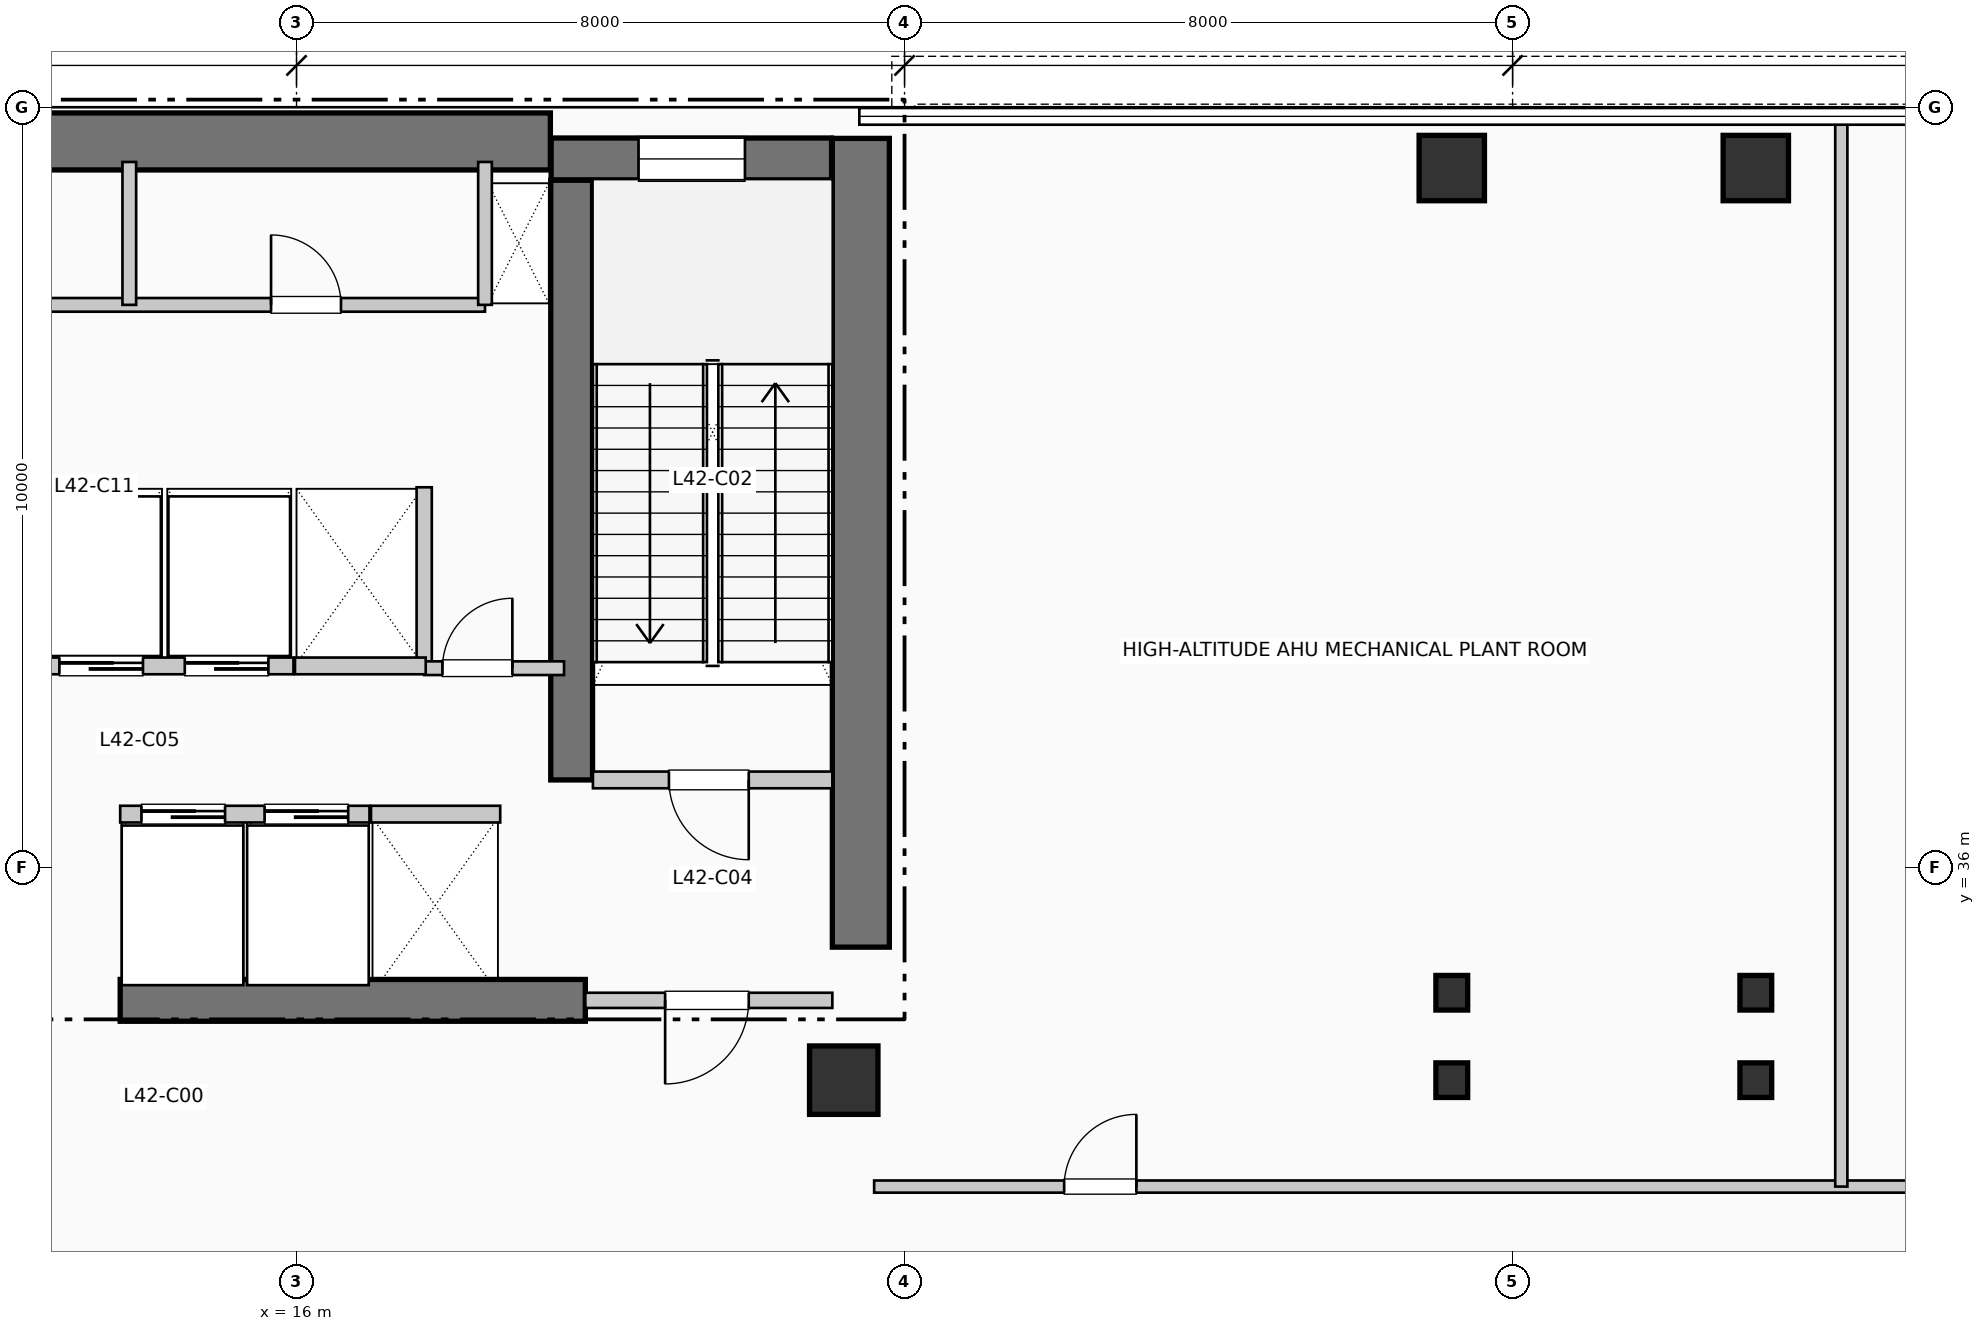
"""IFC4 building model, lengths in metres.
Left out: names, types, materials, properties, quantities, classifications, styles, units other than length and angle.
Written with IfcOpenShell. Run it as: python <this file> out.ifc"""

import sys

from ifc_helpers import new_model, si_unit, direction, frame, frame_2d, origin, origin_2d, place, context, subcontext, project, spatial, rectangle, i_section, extrude, element, fill, save


model = new_model("IFC4")
c1 = context("Model", 3, precision=1e-05, world=origin(), true_north=direction((0.0, 1.0)))
c2 = subcontext(c1, "Body", "Model", "MODEL_VIEW")
j1 = project(units=[si_unit("LENGTHUNIT", "METRE"), si_unit("PLANEANGLEUNIT", "RADIAN")], contexts=[c1])
p1 = place(None, origin())
s1 = spatial("IfcSite", under=j1, at=p1, CompositionType="ELEMENT")
p2 = place(p1, origin())
s2 = spatial("IfcBuilding", under=s1, at=p2, CompositionType="ELEMENT")
p3 = place(p2, frame((0.0, 0.0, 174.57)))
s3 = spatial("IfcBuildingStorey", under=s2, at=p3, CompositionType="ELEMENT", Elevation=174.57)
p4 = place(p3, frame((5.36, 45.55, 0.0), z_axis=(0.0, 0.0, 1.0), x_axis=(1.0, 0.0, 0.0)))
e1 = element("IfcWall", 1, at=p4, inside=s3, PredefinedType="SHEAR", context=c2, shape_type="SweptSolid", body=[
    extrude(rectangle(XDim=13.98, YDim=0.75, at=frame_2d((6.99, 0.0))), origin(), (0.0, 0.0, 1.0), 4.95),
])
p5 = place(p3, frame((23.425, 34.95, 0.0), z_axis=(0.0, 0.0, 1.0), x_axis=(0.0, 1.0, 0.0)))
e2 = element("IfcWall", 2, at=p5, inside=s3, PredefinedType="SHEAR", context=c2, shape_type="SweptSolid", body=[
    extrude(rectangle(XDim=10.64, YDim=0.75, at=frame_2d((5.32, 0.0))), origin(), (0.0, 0.0, 1.0), 4.95),
])
p6 = place(p3, frame((13.68, 34.25, 0.0), z_axis=(0.0, 0.0, 1.0), x_axis=(1.0, 0.0, 0.0)))
e3 = element("IfcWall", 3, at=p6, inside=s3, PredefinedType="SHEAR", context=c2, shape_type="SweptSolid", body=[
    extrude(rectangle(XDim=6.12, YDim=0.55, at=frame_2d((3.06, 0.0))), origin(), (0.0, 0.0, 1.0), 4.95),
])
p7 = place(p3, frame((19.62, 37.15, 0.0), z_axis=(0.0, 0.0, 1.0), x_axis=(0.0, 1.0, 0.0)))
e4 = element("IfcWall", 4, at=p7, inside=s3, PredefinedType="SHEAR", context=c2, shape_type="SweptSolid", body=[
    extrude(rectangle(XDim=7.89, YDim=0.55, at=frame_2d((3.945, 0.0))), origin(), (0.0, 0.0, 1.0), 4.95),
])
p8 = place(p3, frame((19.35, 45.32, 0.0), z_axis=(0.0, 0.0, 1.0), x_axis=(1.0, 0.0, 0.0)))
e5 = element("IfcWall", 5, at=p8, inside=s3, PredefinedType="SHEAR", context=c2, shape_type="SweptSolid", body=[
    extrude(rectangle(XDim=3.69, YDim=0.55, at=frame_2d((1.845, 0.0))), origin(), (0.0, 0.0, 1.0), 4.95),
])
p9 = place(p8, frame((1.15, 0.0, 1.05)))
e6 = element("IfcOpeningElement", 6, at=p9, cuts=e5, PredefinedType="OPENING", context=c2, shape_type="SweptSolid", body=[
    extrude(rectangle(XDim=1.4, YDim=1.8, at=frame_2d((0.7, 0.9))), frame((0.0, 0.285, 0.0), z_axis=(0.0, -1.0, 0.0), x_axis=(1.0, 0.0, 0.0)), (0.0, 0.0, 1.0), 0.57),
])
p10 = place(p3, frame((23.2, 33.2, 0.0), z_axis=(0.0, 0.0, 1.0), x_axis=(1.0, 0.0, 0.0)))
e7 = element("IfcColumn", 7, at=p10, inside=s3, PredefinedType="COLUMN", context=c2, shape_type="SweptSolid", body=[
    extrude(rectangle(XDim=0.9, YDim=0.9, at=origin_2d()), origin(), (0.0, 0.0, 1.0), 4.95),
])
for number, where, z_axis, x_axis in (
    (8, (31.2, 33.2, 0.0), (0.0, 0.0, 1.0), (1.0, 0.0, 0.0)),
    (9, (31.2, 34.35, 0.0), (0.0, 0.0, 1.0), (1.0, 0.0, 0.0)),
):
    element("IfcColumn", number, at=place(p3, frame(where, z_axis=z_axis, x_axis=x_axis)), inside=s3, PredefinedType="COLUMN", context=c2, shape_type="SweptSolid", body=[
        extrude(i_section(OverallWidth=0.418, OverallDepth=0.455, WebThickness=0.032, FlangeThickness=0.051, at=origin_2d()), origin(), (0.0, 0.0, 1.0), 4.95),
    ])
p11 = place(p3, frame((31.2, 45.2, 0.0), z_axis=(0.0, 0.0, 1.0), x_axis=(1.0, 0.0, 0.0)))
e10 = element("IfcColumn", 10, at=p11, inside=s3, PredefinedType="COLUMN", context=c2, shape_type="SweptSolid", body=[
    extrude(rectangle(XDim=0.86, YDim=0.86, at=origin_2d()), origin(), (0.0, 0.0, 1.0), 4.95),
])
for number, where, z_axis, x_axis in (
    (11, (35.2, 33.2, 0.0), (0.0, 0.0, 1.0), (1.0, 0.0, 0.0)),
    (12, (35.2, 34.35, 0.0), (0.0, 0.0, 1.0), (1.0, 0.0, 0.0)),
):
    element("IfcColumn", number, at=place(p3, frame(where, z_axis=z_axis, x_axis=x_axis)), inside=s3, PredefinedType="COLUMN", context=c2, shape_type="SweptSolid", body=[
        extrude(i_section(OverallWidth=0.418, OverallDepth=0.455, WebThickness=0.032, FlangeThickness=0.051, at=origin_2d()), origin(), (0.0, 0.0, 1.0), 4.95),
    ])
p12 = place(p3, frame((35.2, 45.2, 0.0), z_axis=(0.0, 0.0, 1.0), x_axis=(1.0, 0.0, 0.0)))
e13 = element("IfcColumn", 13, at=p12, inside=s3, PredefinedType="COLUMN", context=c2, shape_type="SweptSolid", body=[
    extrude(rectangle(XDim=0.86, YDim=0.86, at=origin_2d()), origin(), (0.0, 0.0, 1.0), 4.95),
])
p13 = place(p3, frame((19.9, 37.15, 0.0), z_axis=(0.0, 0.0, 1.0), x_axis=(1.0, 0.0, 0.0)))
e14 = element("IfcWall", 14, at=p13, inside=s3, PredefinedType="PARTITIONING", context=c2, shape_type="SweptSolid", body=[
    extrude(rectangle(XDim=3.15, YDim=0.22, at=frame_2d((1.575, 0.0))), origin(), (0.0, 0.0, 1.0), 4.7),
])
p14 = place(p13, frame((2.05, 0.0, 0.0), z_axis=(0.0, 0.0, 1.0), x_axis=(-1.0, 0.0, 0.0)))
e15 = element("IfcOpeningElement", 15, at=p14, cuts=e14, PredefinedType="OPENING", context=c2, shape_type="SweptSolid", body=[
    extrude(rectangle(XDim=1.05, YDim=2.15, at=frame_2d((0.525, 1.075))), frame((0.0, 0.12, 0.0), z_axis=(0.0, -1.0, 0.0), x_axis=(1.0, 0.0, 0.0)), (0.0, 0.0, 1.0), 0.24),
])
p15 = place(p3, frame((19.8, 34.25, 0.0), z_axis=(0.0, 0.0, 1.0), x_axis=(1.0, 0.0, 0.0)))
e16 = element("IfcWall", 16, at=p15, inside=s3, PredefinedType="PARTITIONING", context=c2, shape_type="SweptSolid", body=[
    extrude(rectangle(XDim=3.25, YDim=0.2, at=frame_2d((1.625, 0.0))), origin(), (0.0, 0.0, 1.0), 4.7),
])
p16 = place(p15, frame((2.15, 0.0, 0.0), z_axis=(0.0, 0.0, 1.0), x_axis=(-1.0, 0.0, 0.0)))
e17 = element("IfcOpeningElement", 17, at=p16, cuts=e16, PredefinedType="OPENING", context=c2, shape_type="SweptSolid", body=[
    extrude(rectangle(XDim=1.1, YDim=2.15, at=frame_2d((0.55, 1.075))), frame((0.0, 0.11, 0.0), z_axis=(0.0, -1.0, 0.0), x_axis=(1.0, 0.0, 0.0)), (0.0, 0.0, 1.0), 0.22),
])
p17 = place(p3, frame((17.68, 38.65, 0.0), z_axis=(0.0, 0.0, 1.0), x_axis=(0.0, 1.0, 0.0)))
e18 = element("IfcWall", 18, at=p17, inside=s3, PredefinedType="PARTITIONING", context=c2, shape_type="SweptSolid", body=[
    extrude(rectangle(XDim=2.35, YDim=0.2, at=frame_2d((1.175, 0.0))), origin(), (0.0, 0.0, 1.0), 4.7),
])
p18 = place(p3, frame((17.68, 38.62, 0.0), z_axis=(0.0, 0.0, 1.0), x_axis=(1.0, 0.0, 0.0)))
e19 = element("IfcWall", 19, at=p18, inside=s3, PredefinedType="PARTITIONING", context=c2, shape_type="SweptSolid", body=[
    extrude(rectangle(XDim=1.84, YDim=0.18, at=frame_2d((0.92, 0.0))), origin(), (0.0, 0.0, 1.0), 4.7),
])
p19 = place(p18, frame((0.24, 0.0, 0.0)))
e20 = element("IfcOpeningElement", 20, at=p19, cuts=e19, PredefinedType="OPENING", context=c2, shape_type="SweptSolid", body=[
    extrude(rectangle(XDim=0.92, YDim=2.1, at=frame_2d((0.46, 1.05))), frame((0.0, 0.1, 0.0), z_axis=(0.0, -1.0, 0.0), x_axis=(1.0, 0.0, 0.0)), (0.0, 0.0, 1.0), 0.2),
])
p20 = place(p3, frame((13.68, 36.7, 0.0), z_axis=(0.0, 0.0, 1.0), x_axis=(1.0, 0.0, 0.0)))
e21 = element("IfcWall", 21, at=p20, inside=s3, PredefinedType="PARTITIONING", context=c2, shape_type="SweptSolid", body=[
    extrude(rectangle(XDim=3.28, YDim=0.22, at=frame_2d((1.64, 0.0))), origin(), (0.0, 0.0, 1.0), 4.7),
])
p21 = place(p20, frame((0.28, 0.0, 0.0)))
e22 = element("IfcOpeningElement", 22, at=p21, cuts=e21, PredefinedType="OPENING", context=c2, shape_type="SweptSolid", body=[
    extrude(rectangle(XDim=1.1, YDim=2.2, at=frame_2d((0.55, 1.1))), frame((0.0, 0.12, 0.0), z_axis=(0.0, -1.0, 0.0), x_axis=(1.0, 0.0, 0.0)), (0.0, 0.0, 1.0), 0.24),
])
p22 = place(p20, frame((1.9, 0.0, 0.0)))
e23 = element("IfcOpeningElement", 23, at=p22, cuts=e21, PredefinedType="OPENING", context=c2, shape_type="SweptSolid", body=[
    extrude(rectangle(XDim=1.1, YDim=2.2, at=frame_2d((0.55, 1.1))), frame((0.0, 0.12, 0.0), z_axis=(0.0, -1.0, 0.0), x_axis=(1.0, 0.0, 0.0)), (0.0, 0.0, 1.0), 0.24),
])
p23 = place(p3, frame((12.58, 38.65, 0.0), z_axis=(0.0, 0.0, 1.0), x_axis=(1.0, 0.0, 0.0)))
e24 = element("IfcWall", 24, at=p23, inside=s3, PredefinedType="PARTITIONING", context=c2, shape_type="SweptSolid", body=[
    extrude(rectangle(XDim=3.38, YDim=0.22, at=frame_2d((1.69, 0.0))), origin(), (0.0, 0.0, 1.0), 4.7),
])
p24 = place(p23, frame((0.3, 0.0, 0.0)))
e25 = element("IfcOpeningElement", 25, at=p24, cuts=e24, PredefinedType="OPENING", context=c2, shape_type="SweptSolid", body=[
    extrude(rectangle(XDim=1.1, YDim=2.2, at=frame_2d((0.55, 1.1))), frame((0.0, 0.12, 0.0), z_axis=(0.0, -1.0, 0.0), x_axis=(1.0, 0.0, 0.0)), (0.0, 0.0, 1.0), 0.24),
])
p25 = place(p23, frame((1.95, 0.0, 0.0)))
e26 = element("IfcOpeningElement", 26, at=p25, cuts=e24, PredefinedType="OPENING", context=c2, shape_type="SweptSolid", body=[
    extrude(rectangle(XDim=1.1, YDim=2.2, at=frame_2d((0.55, 1.1))), frame((0.0, 0.12, 0.0), z_axis=(0.0, -1.0, 0.0), x_axis=(1.0, 0.0, 0.0)), (0.0, 0.0, 1.0), 0.24),
])
p26 = place(p3, frame((16.98, 36.7, 0.0), z_axis=(0.0, 0.0, 1.0), x_axis=(1.0, 0.0, 0.0)))
e27 = element("IfcWall", 27, at=p26, inside=s3, PredefinedType="PARTITIONING", context=c2, shape_type="SweptSolid", body=[
    extrude(rectangle(XDim=1.7, YDim=0.22, at=frame_2d((0.85, 0.0))), origin(), (0.0, 0.0, 1.0), 4.7),
])
p27 = place(p3, frame((15.98, 38.65, 0.0), z_axis=(0.0, 0.0, 1.0), x_axis=(1.0, 0.0, 0.0)))
e28 = element("IfcWall", 28, at=p27, inside=s3, PredefinedType="PARTITIONING", context=c2, shape_type="SweptSolid", body=[
    extrude(rectangle(XDim=1.72, YDim=0.22, at=frame_2d((0.86, 0.0))), origin(), (0.0, 0.0, 1.0), 4.7),
])
p28 = place(p3, frame((9.15, 43.4, 0.0), z_axis=(0.0, 0.0, 1.0), x_axis=(1.0, 0.0, 0.0)))
e29 = element("IfcWall", 29, at=p28, inside=s3, PredefinedType="PLUMBINGWALL", context=c2, shape_type="SweptSolid", body=[
    extrude(rectangle(XDim=9.33, YDim=0.18, at=frame_2d((4.665, 0.0))), origin(), (0.0, 0.0, 1.0), 4.7),
])
p29 = place(p28, frame((1.88, 0.0, 0.0)))
e30 = element("IfcOpeningElement", 30, at=p29, cuts=e29, PredefinedType="OPENING", context=c2, shape_type="SweptSolid", body=[
    extrude(rectangle(XDim=0.92, YDim=2.1, at=frame_2d((0.46, 1.05))), frame((0.0, 0.1, 0.0), z_axis=(0.0, -1.0, 0.0), x_axis=(1.0, 0.0, 0.0)), (0.0, 0.0, 1.0), 0.2),
])
p30 = place(p28, frame((6.515, 0.0, 0.0)))
e31 = element("IfcOpeningElement", 31, at=p30, cuts=e29, PredefinedType="OPENING", context=c2, shape_type="SweptSolid", body=[
    extrude(rectangle(XDim=0.92, YDim=2.1, at=frame_2d((0.46, 1.05))), frame((0.0, 0.1, 0.0), z_axis=(0.0, -1.0, 0.0), x_axis=(1.0, 0.0, 0.0)), (0.0, 0.0, 1.0), 0.2),
])
for number, where, z_axis, x_axis in (
    (32, (18.48, 43.4, 0.0), (0.0, 0.0, 1.0), (0.0, 1.0, 0.0)),
    (33, (13.8, 43.4, 0.0), (0.0, 0.0, 1.0), (0.0, 1.0, 0.0)),
):
    element("IfcWall", number, at=place(p3, frame(where, z_axis=z_axis, x_axis=x_axis)), inside=s3, PredefinedType="PLUMBINGWALL", context=c2, shape_type="SweptSolid", body=[
        extrude(rectangle(XDim=1.88, YDim=0.18, at=frame_2d((0.94, 0.0))), origin(), (0.0, 0.0, 1.0), 4.7),
    ])
p31 = place(p3, frame((23.6, 31.8, 0.0), z_axis=(0.0, 0.0, 1.0), x_axis=(1.0, 0.0, 0.0)))
e34 = element("IfcWall", 34, at=p31, inside=s3, PredefinedType="PARTITIONING", context=c2, shape_type="SweptSolid", body=[
    extrude(rectangle(XDim=25.45, YDim=0.16, at=frame_2d((12.725, 0.0))), origin(), (0.0, 0.0, 1.0), 4.7),
])
p32 = place(p31, frame((2.5, 0.0, 0.0)))
e35 = element("IfcOpeningElement", 35, at=p32, cuts=e34, PredefinedType="OPENING", context=c2, shape_type="SweptSolid", body=[
    extrude(rectangle(XDim=0.95, YDim=2.1, at=frame_2d((0.475, 1.05))), frame((0.0, 0.09, 0.0), z_axis=(0.0, -1.0, 0.0), x_axis=(1.0, 0.0, 0.0)), (0.0, 0.0, 1.0), 0.18),
])
p33 = place(p31, frame((14.725, 0.0, 0.0)))
e36 = element("IfcOpeningElement", 36, at=p33, cuts=e34, PredefinedType="OPENING", context=c2, shape_type="SweptSolid", body=[
    extrude(rectangle(XDim=0.95, YDim=2.1, at=frame_2d((0.475, 1.05))), frame((0.0, 0.09, 0.0), z_axis=(0.0, -1.0, 0.0), x_axis=(1.0, 0.0, 0.0)), (0.0, 0.0, 1.0), 0.18),
])
p34 = place(p3, frame((36.325, 31.8, 0.0), z_axis=(0.0, 0.0, 1.0), x_axis=(0.0, 1.0, 0.0)))
e37 = element("IfcWall", 37, at=p34, inside=s3, PredefinedType="PARTITIONING", context=c2, shape_type="SweptSolid", body=[
    extrude(rectangle(XDim=14.01, YDim=0.16, at=frame_2d((7.005, 0.0))), origin(), (0.0, 0.0, 1.0), 4.7),
])
p35 = place(p9, origin())
e38 = element("IfcWindow", 38, at=p35, inside=s3, PartitioningType="SINGLE_PANEL", PredefinedType="WINDOW", context=c2, shape_type="SweptSolid", body=[
    extrude(rectangle(XDim=1.4, YDim=1.8, at=frame_2d((0.7, 0.9))), frame((0.0, 0.03, 0.0), z_axis=(0.0, -1.0, 0.0), x_axis=(1.0, 0.0, 0.0)), (0.0, 0.0, 1.0), 0.06),
])
fill(e6, e38)
p36 = place(p14, origin())
e39 = element("IfcDoor", 39, at=p36, inside=s3, OperationType="SINGLE_SWING_RIGHT", PredefinedType="DOOR", context=c2, shape_type="SweptSolid", body=[
    extrude(rectangle(XDim=1.05, YDim=2.15, at=frame_2d((0.525, 1.075))), frame((0.0, 0.025, 0.0), z_axis=(0.0, -1.0, 0.0), x_axis=(1.0, 0.0, 0.0)), (0.0, 0.0, 1.0), 0.05),
])
fill(e15, e39)
p37 = place(p16, origin())
e40 = element("IfcDoor", 40, at=p37, inside=s3, OperationType="SINGLE_SWING_LEFT", PredefinedType="DOOR", context=c2, shape_type="SweptSolid", body=[
    extrude(rectangle(XDim=1.1, YDim=2.15, at=frame_2d((0.55, 1.075))), frame((0.0, 0.025, 0.0), z_axis=(0.0, -1.0, 0.0), x_axis=(1.0, 0.0, 0.0)), (0.0, 0.0, 1.0), 0.05),
])
fill(e17, e40)
p38 = place(p19, origin())
e41 = element("IfcDoor", 41, at=p38, inside=s3, OperationType="SINGLE_SWING_RIGHT", PredefinedType="DOOR", context=c2, shape_type="SweptSolid", body=[
    extrude(rectangle(XDim=0.92, YDim=2.1, at=frame_2d((0.46, 1.05))), frame((0.0, 0.025, 0.0), z_axis=(0.0, -1.0, 0.0), x_axis=(1.0, 0.0, 0.0)), (0.0, 0.0, 1.0), 0.05),
])
fill(e20, e41)
p39 = place(p21, origin())
e42 = element("IfcDoor", 42, at=p39, inside=s3, OperationType="SLIDING_TO_RIGHT", PredefinedType="DOOR", context=c2, shape_type="SweptSolid", body=[
    extrude(rectangle(XDim=1.1, YDim=2.2, at=frame_2d((0.55, 1.1))), frame((0.0, 0.025, 0.0), z_axis=(0.0, -1.0, 0.0), x_axis=(1.0, 0.0, 0.0)), (0.0, 0.0, 1.0), 0.05),
])
fill(e22, e42)
p40 = place(p22, origin())
e43 = element("IfcDoor", 43, at=p40, inside=s3, OperationType="SLIDING_TO_RIGHT", PredefinedType="DOOR", context=c2, shape_type="SweptSolid", body=[
    extrude(rectangle(XDim=1.1, YDim=2.2, at=frame_2d((0.55, 1.1))), frame((0.0, 0.025, 0.0), z_axis=(0.0, -1.0, 0.0), x_axis=(1.0, 0.0, 0.0)), (0.0, 0.0, 1.0), 0.05),
])
fill(e23, e43)
p41 = place(p24, origin())
e44 = element("IfcDoor", 44, at=p41, inside=s3, OperationType="SLIDING_TO_RIGHT", PredefinedType="DOOR", context=c2, shape_type="SweptSolid", body=[
    extrude(rectangle(XDim=1.1, YDim=2.2, at=frame_2d((0.55, 1.1))), frame((0.0, 0.025, 0.0), z_axis=(0.0, -1.0, 0.0), x_axis=(1.0, 0.0, 0.0)), (0.0, 0.0, 1.0), 0.05),
])
fill(e25, e44)
p42 = place(p25, origin())
e45 = element("IfcDoor", 45, at=p42, inside=s3, OperationType="SLIDING_TO_RIGHT", PredefinedType="DOOR", context=c2, shape_type="SweptSolid", body=[
    extrude(rectangle(XDim=1.1, YDim=2.2, at=frame_2d((0.55, 1.1))), frame((0.0, 0.025, 0.0), z_axis=(0.0, -1.0, 0.0), x_axis=(1.0, 0.0, 0.0)), (0.0, 0.0, 1.0), 0.05),
])
fill(e26, e45)
p43 = place(p30, origin())
e46 = element("IfcDoor", 46, at=p43, inside=s3, OperationType="SINGLE_SWING_LEFT", PredefinedType="DOOR", context=c2, shape_type="SweptSolid", body=[
    extrude(rectangle(XDim=0.92, YDim=2.1, at=frame_2d((0.46, 1.05))), frame((0.0, 0.025, 0.0), z_axis=(0.0, -1.0, 0.0), x_axis=(1.0, 0.0, 0.0)), (0.0, 0.0, 1.0), 0.05),
])
fill(e31, e46)
p44 = place(p32, origin())
e47 = element("IfcDoor", 47, at=p44, inside=s3, OperationType="SINGLE_SWING_RIGHT", PredefinedType="DOOR", context=c2, shape_type="SweptSolid", body=[
    extrude(rectangle(XDim=0.95, YDim=2.1, at=frame_2d((0.475, 1.05))), frame((0.0, 0.025, 0.0), z_axis=(0.0, -1.0, 0.0), x_axis=(1.0, 0.0, 0.0)), (0.0, 0.0, 1.0), 0.05),
])
fill(e35, e47)
save(model, sys.argv[1])
